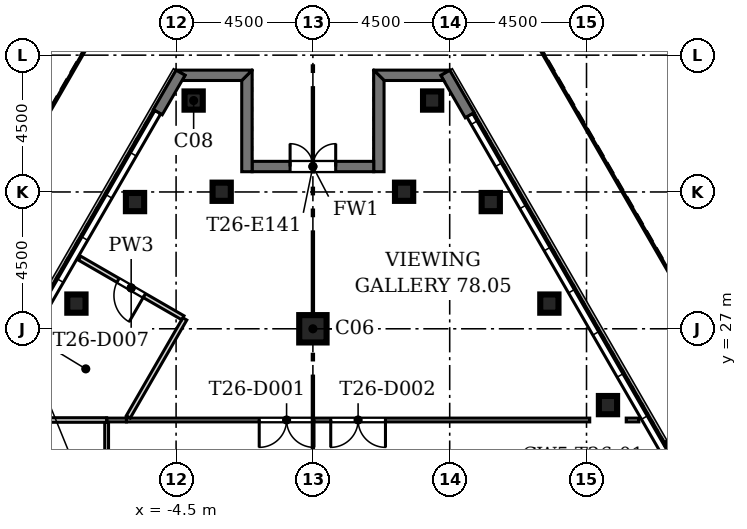
"""IFC4 building model, lengths in metres.
Left out: names, types, materials, properties, quantities, classifications, styles, units other than length and angle.
Written with IfcOpenShell. Run it as: python <this file> out.ifc"""

import sys

from ifc_helpers import new_model, si_unit, direction, frame, frame_2d, origin, origin_2d, place, context, subcontext, project, spatial, polyline, rectangle, hollow_rectangle, outline, extrude, element, fill, save


model = new_model("IFC4")
c1 = context("Model", 3, precision=1e-05, world=origin(), true_north=direction((0.0, 1.0)))
c2 = subcontext(c1, "Body", "Model", "MODEL_VIEW")
j1 = project(units=[si_unit("LENGTHUNIT", "METRE"), si_unit("PLANEANGLEUNIT", "RADIAN")], contexts=[c1])
p1 = place(None, origin())
s1 = spatial("IfcSite", under=j1, at=p1, CompositionType="ELEMENT")
p2 = place(p1, origin())
s2 = spatial("IfcBuilding", under=s1, at=p2, CompositionType="ELEMENT")
p3 = place(p2, frame((0.0, 0.0, 344.7)))
s3 = spatial("IfcBuildingStorey", under=s2, at=p3, CompositionType="ELEMENT", Elevation=344.7)
for number, where, z_axis, x_axis in (
    (1, (9.706, 24.49, 0.0), (0.0, 0.0, 1.0), (1.0, 0.0, 0.0)),
    (2, (7.778, 27.829, 0.0), (0.0, 0.0, 1.0), (1.0, 0.0, 0.0)),
    (3, (5.851, 31.168, 0.0), (0.0, 0.0, 1.0), (1.0, 0.0, 0.0)),
    (4, (3.923, 34.507, 0.0), (0.0, 0.0, 1.0), (1.0, 0.0, 0.0)),
    (5, (3.0, 31.507, 0.0), (0.0, 0.0, 1.0), (1.0, 0.0, 0.0)),
    (6, (-3.0, 31.507, 0.0), (0.0, 0.0, 1.0), (1.0, 0.0, 0.0)),
    (7, (-3.923, 34.507, 0.0), (0.0, 0.0, 1.0), (1.0, 0.0, 0.0)),
    (8, (-5.851, 31.168, 0.0), (0.0, 0.0, 1.0), (1.0, 0.0, 0.0)),
    (9, (-7.778, 27.829, 0.0), (0.0, 0.0, 1.0), (1.0, 0.0, 0.0)),
):
    element("IfcColumn", number, at=place(p3, frame(where, z_axis=z_axis, x_axis=x_axis)), inside=s3, PredefinedType="COLUMN", context=c2, shape_type="SweptSolid", body=[
        extrude(hollow_rectangle(XDim=0.6, YDim=0.6, WallThickness=0.03, at=origin_2d()), origin(), (0.0, 0.0, 1.0), 4.8),
    ])
p4 = place(p3, frame((0.0, 27.0, 0.0), z_axis=(0.0, 0.0, 1.0), x_axis=(1.0, 0.0, 0.0)))
e10 = element("IfcColumn", 10, at=p4, inside=s3, PredefinedType="COLUMN", context=c2, shape_type="SweptSolid", body=[
    extrude(rectangle(XDim=0.9, YDim=0.9, at=origin_2d()), origin(), (0.0, 0.0, 1.0), 5.4),
])
p5 = place(p3, frame((5.16, 34.023, 0.0), z_axis=(0.0, 0.0, 1.0), x_axis=(-0.500040847832, 0.866001818993, 0.0)))
e11 = element("IfcWall", 11, at=p5, inside=s3, PredefinedType="SOLIDWALL", context=c2, shape_type="SweptSolid", body=[
    extrude(rectangle(XDim=1.615, YDim=0.34, at=frame_2d((0.808, 0.0))), origin(), (0.0, 0.0, 1.0), 4.8),
])
p6 = place(p3, origin())
e12 = element("IfcWall", 12, at=p6, inside=s3, PredefinedType="SOLIDWALL", context=c2, shape_type="SweptSolid", body=[
    extrude(outline(polyline([(1.999, 35.508), (4.501, 35.508), (4.501, 35.507), (4.206, 35.337), (4.305, 35.167), (2.34, 35.167), (1.999, 35.507), (1.999, 35.508)])), origin(), (0.0, 0.0, 1.0), 4.8),
])
p7 = place(p3, origin())
e13 = element("IfcWall", 13, at=p7, inside=s3, PredefinedType="SOLIDWALL", context=c2, shape_type="SweptSolid", body=[
    extrude(outline(polyline([(2.341, 32.167), (2.0, 32.167), (2.0, 35.508), (2.0, 35.508), (2.341, 35.167), (2.341, 32.167)])), origin(), (0.0, 0.0, 1.0), 4.8),
])
p8 = place(p3, frame((2.0, 32.337, 0.0), z_axis=(0.0, 0.0, 1.0), x_axis=(-1.0, 0.0, 0.0)))
e14 = element("IfcWall", 14, at=p8, inside=s3, PredefinedType="SOLIDWALL", context=c2, shape_type="SweptSolid", body=[
    extrude(rectangle(XDim=4.0, YDim=0.34, at=frame_2d((2.0, 0.0))), origin(), (0.0, 0.0, 1.0), 4.8),
])
p9 = place(p8, frame((1.25, 0.0, 0.0)))
e15 = element("IfcOpeningElement", 15, at=p9, cuts=e14, PredefinedType="OPENING", context=c2, shape_type="SweptSolid", body=[
    extrude(rectangle(XDim=1.5, YDim=2.4, at=frame_2d((0.75, 1.2))), frame((0.0, 0.18, 0.0), z_axis=(0.0, -1.0, 0.0), x_axis=(1.0, 0.0, 0.0)), (0.0, 0.0, 1.0), 0.36),
])
p10 = place(p3, origin())
e16 = element("IfcWall", 16, at=p10, inside=s3, PredefinedType="SOLIDWALL", context=c2, shape_type="SweptSolid", body=[
    extrude(outline(polyline([(-2.0, 35.508), (-2.0, 32.167), (-2.341, 32.167), (-2.341, 35.167), (-2.0, 35.508), (-2.0, 35.508)])), origin(), (0.0, 0.0, 1.0), 4.8),
])
p11 = place(p3, origin())
e17 = element("IfcWall", 17, at=p11, inside=s3, PredefinedType="SOLIDWALL", context=c2, shape_type="SweptSolid", body=[
    extrude(outline(polyline([(-4.305, 35.167), (-4.206, 35.337), (-4.501, 35.507), (-4.501, 35.508), (-1.999, 35.508), (-1.999, 35.507), (-2.34, 35.167), (-4.305, 35.167)])), origin(), (0.0, 0.0, 1.0), 4.8),
])
p12 = place(p3, frame((-4.353, 35.422, 0.0), z_axis=(0.0, 0.0, 1.0), x_axis=(-0.499990139034, -0.866031096941, 0.0)))
e18 = element("IfcWall", 18, at=p12, inside=s3, PredefinedType="SOLIDWALL", context=c2, shape_type="SweptSolid", body=[
    extrude(rectangle(XDim=1.5, YDim=0.34, at=frame_2d((0.75, 0.0))), origin(), (0.0, 0.0, 1.0), 4.8),
])
p13 = place(p3, frame((-6.132, 24.0, 0.0), z_axis=(0.0, 0.0, 1.0), x_axis=(1.0, 0.0, 0.0)))
e19 = element("IfcWall", 19, at=p13, inside=s3, PredefinedType="PARTITIONING", context=c2, shape_type="SweptSolid", body=[
    extrude(rectangle(XDim=15.238, YDim=0.125, at=frame_2d((7.619, 0.0))), origin(), (0.0, 0.0, 1.0), 4.8),
])
p14 = place(p13, frame((4.367, 0.0, 0.0)))
e20 = element("IfcOpeningElement", 20, at=p14, cuts=e19, PredefinedType="OPENING", context=c2, shape_type="SweptSolid", body=[
    extrude(rectangle(XDim=1.8, YDim=2.1, at=frame_2d((0.9, 1.05))), frame((0.0, 0.073, 0.0), z_axis=(0.0, -1.0, 0.0), x_axis=(1.0, 0.0, 0.0)), (0.0, 0.0, 1.0), 0.145),
])
p15 = place(p13, frame((6.719, 0.0, 0.0)))
e21 = element("IfcOpeningElement", 21, at=p15, cuts=e19, PredefinedType="OPENING", context=c2, shape_type="SweptSolid", body=[
    extrude(rectangle(XDim=1.8, YDim=2.1, at=frame_2d((0.9, 1.05))), frame((0.0, 0.073, 0.0), z_axis=(0.0, -1.0, 0.0), x_axis=(1.0, 0.0, 0.0)), (0.0, 0.0, 1.0), 0.145),
])
p16 = place(p3, frame((10.306, 24.0, 0.0), z_axis=(0.0, 0.0, 1.0), x_axis=(1.0, 0.0, 0.0)))
e22 = element("IfcWall", 22, at=p16, inside=s3, PredefinedType="PARTITIONING", context=c2, shape_type="SweptSolid", body=[
    extrude(rectangle(XDim=0.415, YDim=0.125, at=frame_2d((0.208, 0.0))), origin(), (0.0, 0.0, 1.0), 4.8),
])
p17 = place(p3, frame((-6.784, 24.0, 0.0), z_axis=(0.0, 0.0, 1.0), x_axis=(1.0, 0.0, 0.0)))
e23 = element("IfcWall", 23, at=p17, inside=s3, PredefinedType="PARTITIONING", context=c2, shape_type="SweptSolid", body=[
    extrude(rectangle(XDim=0.652, YDim=0.125, at=frame_2d((0.326, 0.0))), origin(), (0.0, 0.0, 1.0), 4.8),
])
p18 = place(p3, frame((-6.784, 21.7, 0.0), z_axis=(0.0, 0.0, 1.0), x_axis=(0.0, 1.0, 0.0)))
e24 = element("IfcWall", 24, at=p18, inside=s3, PredefinedType="PARTITIONING", context=c2, shape_type="SweptSolid", body=[
    extrude(rectangle(XDim=2.225, YDim=0.125, at=frame_2d((1.113, 0.0))), origin(), (0.0, 0.0, 1.0), 4.8),
])
p19 = place(p3, frame((-6.074, 24.1, 0.0), z_axis=(0.0, 0.0, 1.0), x_axis=(0.499996803041, 0.866027249542, 0.0)))
e25 = element("IfcWall", 25, at=p19, inside=s3, PredefinedType="PARTITIONING", context=c2, shape_type="SweptSolid", body=[
    extrude(rectangle(XDim=3.723, YDim=0.15, at=frame_2d((1.862, 0.0))), origin(), (0.0, 0.0, 1.0), 4.8),
])
p20 = place(p3, frame((-4.278, 27.362, 0.0), z_axis=(0.0, 0.0, 1.0), x_axis=(-0.866037464623, 0.499979109433, 0.0)))
e26 = element("IfcWall", 26, at=p20, inside=s3, PredefinedType="PARTITIONING", context=c2, shape_type="SweptSolid", body=[
    extrude(rectangle(XDim=3.925, YDim=0.15, at=frame_2d((1.962, 0.0))), origin(), (0.0, 0.0, 1.0), 4.8),
])
p21 = place(p20, frame((1.462, 0.0, 0.0)))
e27 = element("IfcOpeningElement", 27, at=p21, cuts=e26, PredefinedType="OPENING", context=c2, shape_type="SweptSolid", body=[
    extrude(rectangle(XDim=1.0, YDim=2.1, at=frame_2d((0.5, 1.05))), frame((0.0, 0.085, 0.0), z_axis=(0.0, -1.0, 0.0), x_axis=(1.0, 0.0, 0.0)), (0.0, 0.0, 1.0), 0.17),
])
p22 = place(p3, frame((-6.784, 24.0, 0.0), z_axis=(0.0, 0.0, 1.0), x_axis=(-1.0, 0.0, 0.0)))
e28 = element("IfcWall", 28, at=p22, inside=s3, PredefinedType="PARTITIONING", context=c2, shape_type="SweptSolid", body=[
    extrude(rectangle(XDim=2.322, YDim=0.15, at=frame_2d((1.161, 0.0))), origin(), (0.0, 0.0, 1.0), 4.8),
])
p23 = place(p9, frame((1.5, 0.0, 0.0), z_axis=(0.0, 0.0, 1.0), x_axis=(-1.0, 0.0, 0.0)))
e29 = element("IfcDoor", 29, at=p23, inside=s3, OperationType="DOUBLE_DOOR_SINGLE_SWING", PredefinedType="DOOR", context=c2, shape_type="SweptSolid", body=[
    extrude(rectangle(XDim=1.5, YDim=2.4, at=frame_2d((0.75, 1.2))), frame((0.0, 0.025, 0.0), z_axis=(0.0, -1.0, 0.0), x_axis=(1.0, 0.0, 0.0)), (0.0, 0.0, 1.0), 0.05),
])
fill(e15, e29)
p24 = place(p14, frame((1.8, 0.0, 0.0), z_axis=(0.0, 0.0, 1.0), x_axis=(-1.0, 0.0, 0.0)))
e30 = element("IfcDoor", 30, at=p24, inside=s3, OperationType="DOUBLE_DOOR_SINGLE_SWING", PredefinedType="DOOR", context=c2, shape_type="SweptSolid", body=[
    extrude(rectangle(XDim=1.8, YDim=2.1, at=frame_2d((0.9, 1.05))), frame((0.0, 0.025, 0.0), z_axis=(0.0, -1.0, 0.0), x_axis=(1.0, 0.0, 0.0)), (0.0, 0.0, 1.0), 0.05),
])
fill(e20, e30)
p25 = place(p15, frame((1.8, 0.0, 0.0), z_axis=(0.0, 0.0, 1.0), x_axis=(-1.0, 0.0, 0.0)))
e31 = element("IfcDoor", 31, at=p25, inside=s3, OperationType="DOUBLE_DOOR_SINGLE_SWING", PredefinedType="DOOR", context=c2, shape_type="SweptSolid", body=[
    extrude(rectangle(XDim=1.8, YDim=2.1, at=frame_2d((0.9, 1.05))), frame((0.0, 0.025, 0.0), z_axis=(0.0, -1.0, 0.0), x_axis=(1.0, 0.0, 0.0)), (0.0, 0.0, 1.0), 0.05),
])
fill(e21, e31)
p26 = place(p21, origin())
e32 = element("IfcDoor", 32, at=p26, inside=s3, OperationType="SINGLE_SWING_LEFT", PredefinedType="DOOR", context=c2, shape_type="SweptSolid", body=[
    extrude(rectangle(XDim=1.0, YDim=2.1, at=frame_2d((0.5, 1.05))), frame((0.0, 0.025, 0.0), z_axis=(0.0, -1.0, 0.0), x_axis=(1.0, 0.0, 0.0)), (0.0, 0.0, 1.0), 0.05),
])
fill(e27, e32)
save(model, sys.argv[1])
